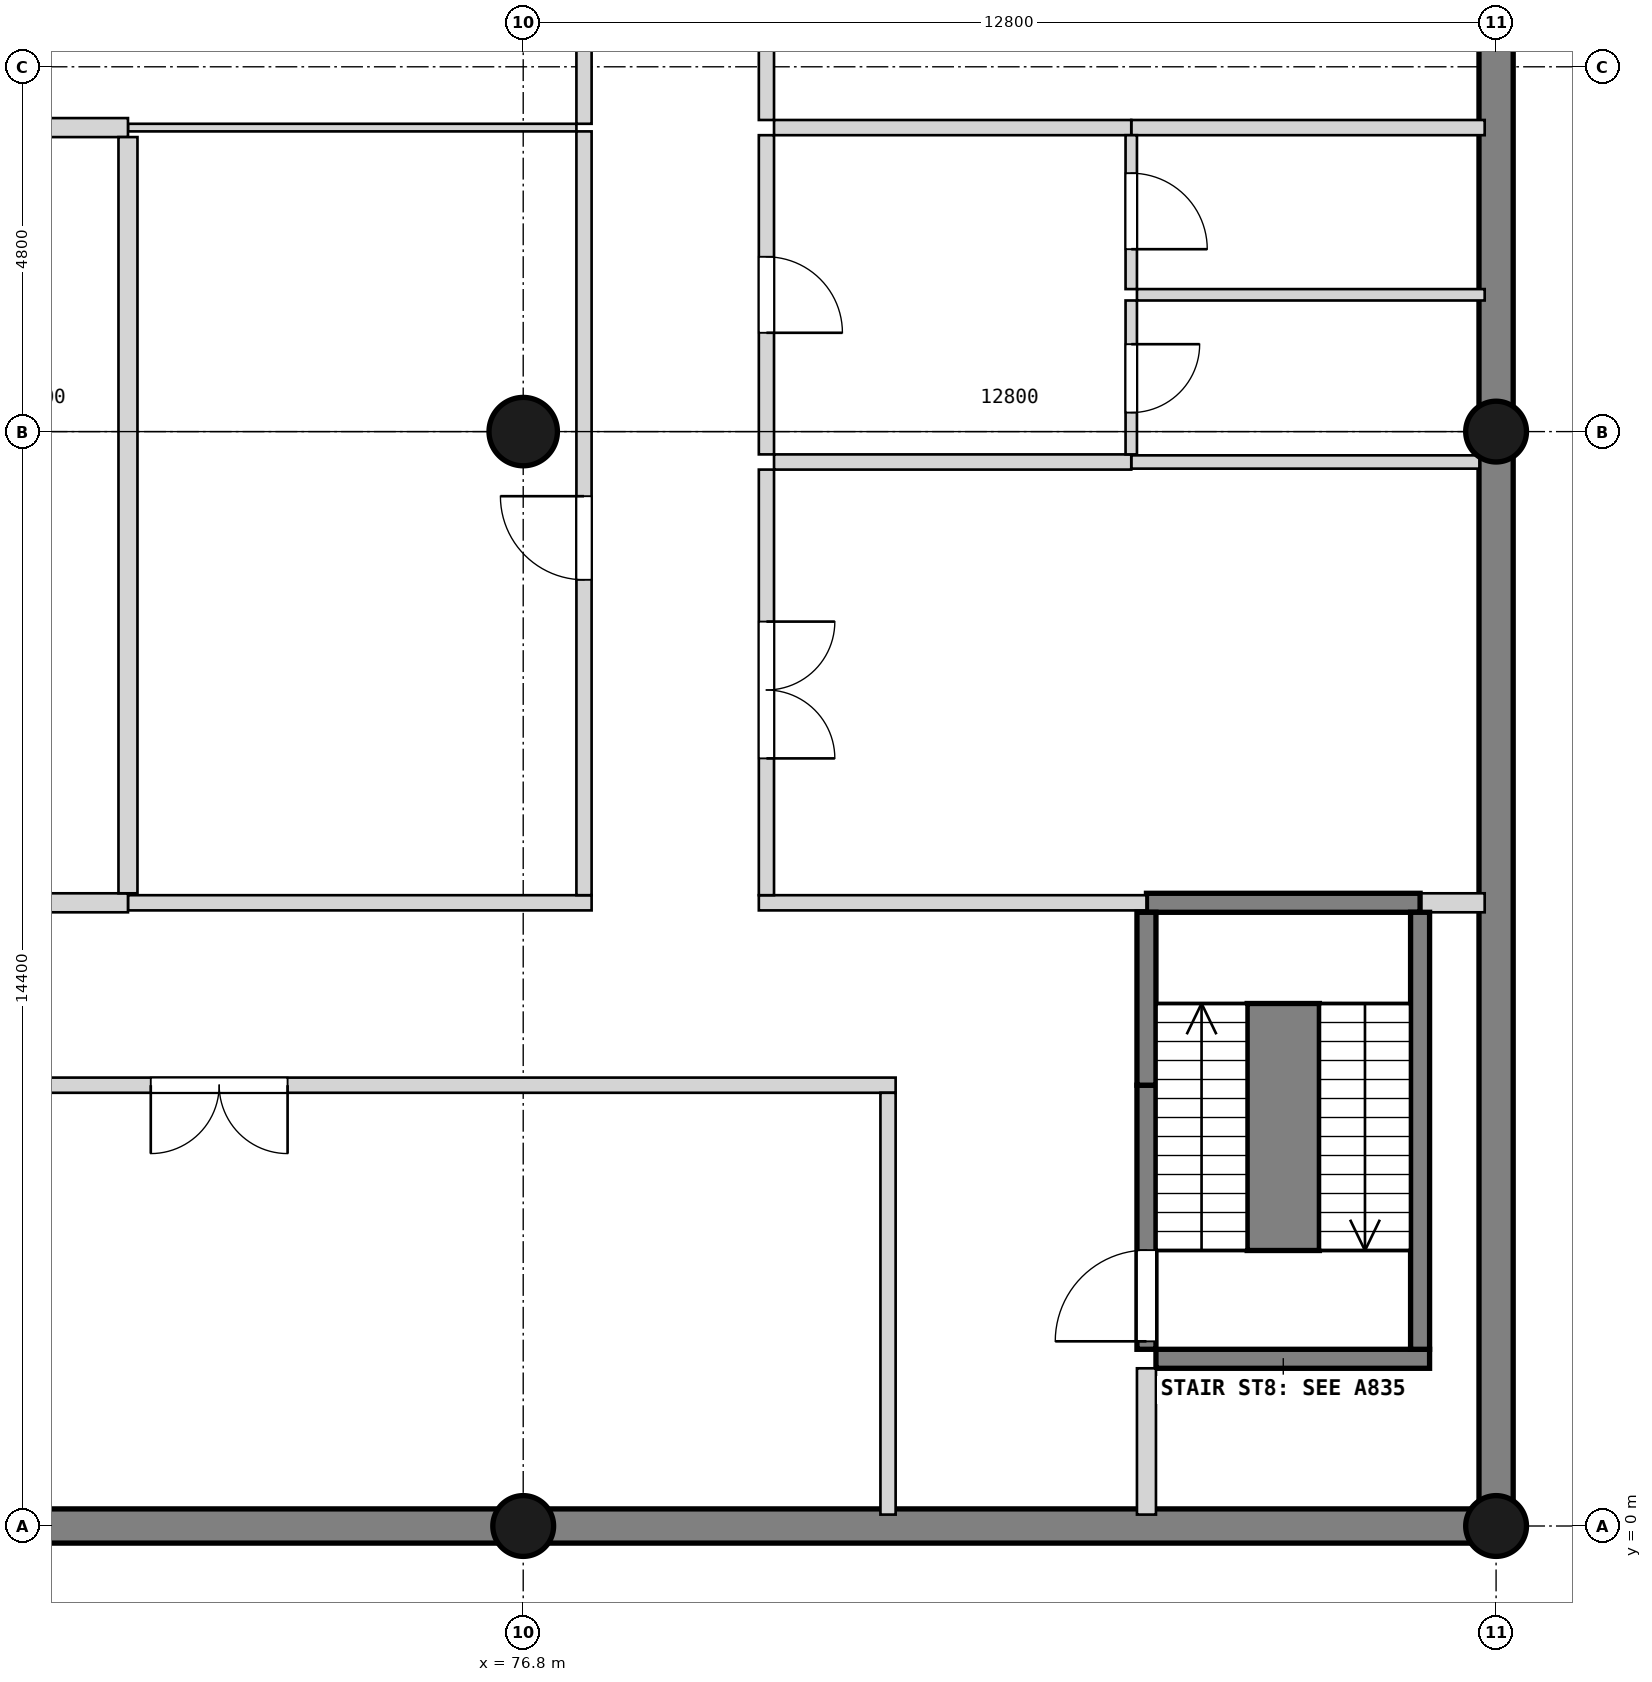
"""IFC4 building model, lengths in metres.
Left out: names, types, materials, properties, quantities, classifications, styles, units other than length and angle.
Written with IfcOpenShell. Run it as: python <this file> out.ifc"""

import sys

from ifc_helpers import new_model, si_unit, direction, frame, frame_2d, origin, origin_2d, place, context, subcontext, project, spatial, rectangle, circle, extrude, element, fill, save


model = new_model("IFC4")
c1 = context("Model", 3, precision=1e-05, world=origin(), true_north=direction((0.0, 1.0)))
c2 = subcontext(c1, "Body", "Model", "MODEL_VIEW")
j1 = project(units=[si_unit("LENGTHUNIT", "METRE"), si_unit("PLANEANGLEUNIT", "RADIAN")], contexts=[c1])
p1 = place(None, origin())
s1 = spatial("IfcSite", under=j1, at=p1, CompositionType="ELEMENT")
p2 = place(p1, origin())
s2 = spatial("IfcBuilding", under=s1, at=p2, CompositionType="ELEMENT")
p3 = place(p2, frame((0.0, 0.0, -4.8)))
s3 = spatial("IfcBuildingStorey", under=s2, at=p3, CompositionType="ELEMENT", Elevation=-4.8)
p4 = place(p3, frame((89.6, -0.225, 0.0), z_axis=(0.0, 0.0, 1.0), x_axis=(0.0, 1.0, 0.0)))
e1 = element("IfcWall", 1, at=p4, inside=s3, PredefinedType="SOLIDWALL", context=c2, shape_type="SweptSolid", body=[
    extrude(rectangle(XDim=58.05, YDim=0.45, at=frame_2d((29.025, 0.0))), origin(), (0.0, 0.0, 1.0), 4.8),
])
p5 = place(p3, frame((89.375, 0.0, 0.0), z_axis=(0.0, 0.0, 1.0), x_axis=(-1.0, 0.0, 0.0)))
e2 = element("IfcWall", 2, at=p5, inside=s3, PredefinedType="SOLIDWALL", context=c2, shape_type="SweptSolid", body=[
    extrude(rectangle(XDim=25.15, YDim=0.45, at=frame_2d((12.575, 0.0))), origin(), (0.0, 0.0, 1.0), 4.8),
])
for number, where, z_axis, x_axis in (
    (3, (89.6, 0.0, 0.0), (0.0, 0.0, 1.0), (1.0, 0.0, 0.0)),
    (4, (89.6, 14.4, 0.0), (0.0, 0.0, 1.0), (1.0, 0.0, 0.0)),
    (5, (76.8, 0.0, 0.0), (0.0, 0.0, 1.0), (1.0, 0.0, 0.0)),
):
    element("IfcColumn", number, at=place(p3, frame(where, z_axis=z_axis, x_axis=x_axis)), inside=s3, PredefinedType="COLUMN", context=c2, shape_type="SweptSolid", body=[
        extrude(circle(Radius=0.4, at=origin_2d()), origin(), (0.0, 0.0, 1.0), 4.8),
    ])
p6 = place(p3, frame((76.8, 14.4, 0.0), z_axis=(0.0, 0.0, 1.0), x_axis=(1.0, 0.0, 0.0)))
e6 = element("IfcColumn", 6, at=p6, inside=s3, PredefinedType="COLUMN", context=c2, shape_type="SweptSolid", body=[
    extrude(circle(Radius=0.45, at=origin_2d()), origin(), (0.0, 0.0, 1.0), 4.8),
])
p7 = place(p3, frame((88.725, 2.2, 0.0), z_axis=(0.0, 0.0, 1.0), x_axis=(-1.0, 0.0, 0.0)))
e7 = element("IfcWall", 7, at=p7, inside=s3, PredefinedType="SHEAR", context=c2, shape_type="SweptSolid", body=[
    extrude(rectangle(XDim=3.6, YDim=0.25, at=frame_2d((1.8, 0.0))), origin(), (0.0, 0.0, 1.0), 4.5),
])
p8 = place(p3, frame((81.7, 5.8, 0.0), z_axis=(0.0, 0.0, 1.0), x_axis=(-1.0, 0.0, 0.0)))
e8 = element("IfcWall", 8, at=p8, inside=s3, PredefinedType="PARTITIONING", context=c2, shape_type="SweptSolid", body=[
    extrude(rectangle(XDim=17.55, YDim=0.2, at=frame_2d((8.775, 0.0))), origin(), (0.0, 0.0, 1.0), 4.5),
])
p9 = place(p8, frame((8.0, 0.0, 0.0)))
e9 = element("IfcOpeningElement", 9, at=p9, cuts=e8, PredefinedType="OPENING", context=c2, shape_type="SweptSolid", body=[
    extrude(rectangle(XDim=1.8, YDim=2.1, at=frame_2d((0.9, 1.05))), frame((0.0, 0.11, 0.0), z_axis=(0.0, -1.0, 0.0), x_axis=(1.0, 0.0, 0.0)), (0.0, 0.0, 1.0), 0.22),
])
p10 = place(p3, frame((89.45, 8.2, 0.0), z_axis=(0.0, 0.0, 1.0), x_axis=(-1.0, 0.0, 0.0)))
e10 = element("IfcWall", 10, at=p10, inside=s3, PredefinedType="PARTITIONING", context=c2, shape_type="SweptSolid", body=[
    extrude(rectangle(XDim=0.85, YDim=0.25, at=frame_2d((0.425, 0.0))), origin(), (0.0, 0.0, 1.0), 4.5),
])
p11 = place(p3, frame((88.6, 8.2, 0.0), z_axis=(0.0, 0.0, 1.0), x_axis=(-1.0, 0.0, 0.0)))
e11 = element("IfcWall", 11, at=p11, inside=s3, PredefinedType="SHEAR", context=c2, shape_type="SweptSolid", body=[
    extrude(rectangle(XDim=3.6, YDim=0.25, at=frame_2d((1.8, 0.0))), origin(), (0.0, 0.0, 1.0), 4.5),
])
p12 = place(p3, frame((85.0, 8.2, 0.0), z_axis=(0.0, 0.0, 1.0), x_axis=(-1.0, 0.0, 0.0)))
e12 = element("IfcWall", 12, at=p12, inside=s3, PredefinedType="PARTITIONING", context=c2, shape_type="SweptSolid", body=[
    extrude(rectangle(XDim=5.1, YDim=0.2, at=frame_2d((2.55, 0.0))), origin(), (0.0, 0.0, 1.0), 4.5),
])
p13 = place(p3, frame((77.7, 8.2, 0.0), z_axis=(0.0, 0.0, 1.0), x_axis=(-1.0, 0.0, 0.0)))
e13 = element("IfcWall", 13, at=p13, inside=s3, PredefinedType="PARTITIONING", context=c2, shape_type="SweptSolid", body=[
    extrude(rectangle(XDim=6.1, YDim=0.2, at=frame_2d((3.05, 0.0))), origin(), (0.0, 0.0, 1.0), 4.5),
])
p14 = place(p3, frame((71.6, 8.2, 0.0), z_axis=(0.0, 0.0, 1.0), x_axis=(-1.0, 0.0, 0.0)))
e14 = element("IfcWall", 14, at=p14, inside=s3, PredefinedType="PARTITIONING", context=c2, shape_type="SweptSolid", body=[
    extrude(rectangle(XDim=7.45, YDim=0.25, at=frame_2d((3.725, 0.0))), origin(), (0.0, 0.0, 1.0), 4.5),
])
p15 = place(p14, frame((3.3, 0.0, 0.0)))
e15 = element("IfcOpeningElement", 15, at=p15, cuts=e14, PredefinedType="OPENING", context=c2, shape_type="SweptSolid", body=[
    extrude(rectangle(XDim=1.0, YDim=2.1, at=frame_2d((0.5, 1.05))), frame((0.0, 0.135, 0.0), z_axis=(0.0, -1.0, 0.0), x_axis=(1.0, 0.0, 0.0)), (0.0, 0.0, 1.0), 0.27),
])
p16 = place(p3, frame((89.38, 14.0, 0.0), z_axis=(0.0, 0.0, 1.0), x_axis=(-1.0, 0.0, 0.0)))
e16 = element("IfcWall", 16, at=p16, inside=s3, PredefinedType="PARTITIONING", context=c2, shape_type="SweptSolid", body=[
    extrude(rectangle(XDim=4.58, YDim=0.175, at=frame_2d((2.29, 0.0))), origin(), (0.0, 0.0, 1.0), 4.5),
])
p17 = place(p3, frame((84.8, 14.0, 0.0), z_axis=(0.0, 0.0, 1.0), x_axis=(-1.0, 0.0, 0.0)))
e17 = element("IfcWall", 17, at=p17, inside=s3, PredefinedType="PARTITIONING", context=c2, shape_type="SweptSolid", body=[
    extrude(rectangle(XDim=4.7, YDim=0.2, at=frame_2d((2.35, 0.0))), origin(), (0.0, 0.0, 1.0), 4.5),
])
p18 = place(p3, frame((89.45, 16.2, 0.0), z_axis=(0.0, 0.0, 1.0), x_axis=(-1.0, 0.0, 0.0)))
e18 = element("IfcWall", 18, at=p18, inside=s3, PredefinedType="PARTITIONING", context=c2, shape_type="SweptSolid", body=[
    extrude(rectangle(XDim=4.575, YDim=0.15, at=frame_2d((2.288, 0.0))), origin(), (0.0, 0.0, 1.0), 4.5),
])
p19 = place(p3, frame((89.45, 18.4, 0.0), z_axis=(0.0, 0.0, 1.0), x_axis=(-1.0, 0.0, 0.0)))
e19 = element("IfcWall", 19, at=p19, inside=s3, PredefinedType="PARTITIONING", context=c2, shape_type="SweptSolid", body=[
    extrude(rectangle(XDim=4.65, YDim=0.2, at=frame_2d((2.325, 0.0))), origin(), (0.0, 0.0, 1.0), 4.5),
])
p20 = place(p3, frame((84.8, 18.4, 0.0), z_axis=(0.0, 0.0, 1.0), x_axis=(-1.0, 0.0, 0.0)))
e20 = element("IfcWall", 20, at=p20, inside=s3, PredefinedType="PARTITIONING", context=c2, shape_type="SweptSolid", body=[
    extrude(rectangle(XDim=4.7, YDim=0.2, at=frame_2d((2.35, 0.0))), origin(), (0.0, 0.0, 1.0), 4.5),
])
p21 = place(p3, frame((77.5, 18.4, 0.0), z_axis=(0.0, 0.0, 1.0), x_axis=(-1.0, 0.0, 0.0)))
e21 = element("IfcWall", 21, at=p21, inside=s3, PredefinedType="PARTITIONING", context=c2, shape_type="SweptSolid", body=[
    extrude(rectangle(XDim=5.9, YDim=0.1, at=frame_2d((2.95, 0.0))), origin(), (0.0, 0.0, 1.0), 4.5),
])
p22 = place(p3, frame((71.6, 18.4, 0.0), z_axis=(0.0, 0.0, 1.0), x_axis=(-1.0, 0.0, 0.0)))
e22 = element("IfcWall", 22, at=p22, inside=s3, PredefinedType="PARTITIONING", context=c2, shape_type="SweptSolid", body=[
    extrude(rectangle(XDim=7.45, YDim=0.25, at=frame_2d((3.725, 0.0))), origin(), (0.0, 0.0, 1.0), 4.5),
])
p23 = place(p3, frame((88.6, 2.325, 0.0), z_axis=(0.0, 0.0, 1.0), x_axis=(0.0, 1.0, 0.0)))
e23 = element("IfcWall", 23, at=p23, inside=s3, PredefinedType="SHEAR", context=c2, shape_type="SweptSolid", body=[
    extrude(rectangle(XDim=5.75, YDim=0.25, at=frame_2d((2.875, 0.0))), origin(), (0.0, 0.0, 1.0), 4.5),
])
p24 = place(p3, frame((85.0, 0.15, 0.0), z_axis=(0.0, 0.0, 1.0), x_axis=(0.0, 1.0, 0.0)))
e24 = element("IfcWall", 24, at=p24, inside=s3, PredefinedType="PARTITIONING", context=c2, shape_type="SweptSolid", body=[
    extrude(rectangle(XDim=1.925, YDim=0.25, at=frame_2d((0.962, 0.0))), origin(), (0.0, 0.0, 1.0), 4.5),
])
p25 = place(p3, frame((85.0, 2.325, 0.0), z_axis=(0.0, 0.0, 1.0), x_axis=(0.0, 1.0, 0.0)))
e25 = element("IfcWall", 25, at=p25, inside=s3, PredefinedType="SHEAR", context=c2, shape_type="SweptSolid", body=[
    extrude(rectangle(XDim=3.475, YDim=0.25, at=frame_2d((1.738, 0.0))), origin(), (0.0, 0.0, 1.0), 4.5),
])
p26 = place(p25, frame((0.105, 0.0, 0.0)))
e26 = element("IfcOpeningElement", 26, at=p26, cuts=e25, PredefinedType="OPENING", context=c2, shape_type="SweptSolid", body=[
    extrude(rectangle(XDim=1.2, YDim=2.1, at=frame_2d((0.6, 1.05))), frame((0.0, 0.135, 0.0), z_axis=(0.0, -1.0, 0.0), x_axis=(1.0, 0.0, 0.0)), (0.0, 0.0, 1.0), 0.27),
])
p27 = place(p3, frame((85.0, 5.8, 0.0), z_axis=(0.0, 0.0, 1.0), x_axis=(0.0, 1.0, 0.0)))
e27 = element("IfcWall", 27, at=p27, inside=s3, PredefinedType="SHEAR", context=c2, shape_type="SweptSolid", body=[
    extrude(rectangle(XDim=2.275, YDim=0.25, at=frame_2d((1.137, 0.0))), origin(), (0.0, 0.0, 1.0), 4.5),
])
p28 = place(p3, frame((84.8, 14.1, 0.0), z_axis=(0.0, 0.0, 1.0), x_axis=(0.0, 1.0, 0.0)))
e28 = element("IfcWall", 28, at=p28, inside=s3, PredefinedType="PARTITIONING", context=c2, shape_type="SweptSolid", body=[
    extrude(rectangle(XDim=2.025, YDim=0.15, at=frame_2d((1.012, 0.0))), origin(), (0.0, 0.0, 1.0), 4.5),
])
p29 = place(p28, frame((0.55, 0.0, 0.0)))
e29 = element("IfcOpeningElement", 29, at=p29, cuts=e28, PredefinedType="OPENING", context=c2, shape_type="SweptSolid", body=[
    extrude(rectangle(XDim=0.9, YDim=2.1, at=frame_2d((0.45, 1.05))), frame((0.0, 0.085, 0.0), z_axis=(0.0, -1.0, 0.0), x_axis=(1.0, 0.0, 0.0)), (0.0, 0.0, 1.0), 0.17),
])
p30 = place(p3, frame((84.8, 16.275, 0.0), z_axis=(0.0, 0.0, 1.0), x_axis=(0.0, 1.0, 0.0)))
e30 = element("IfcWall", 30, at=p30, inside=s3, PredefinedType="PARTITIONING", context=c2, shape_type="SweptSolid", body=[
    extrude(rectangle(XDim=2.025, YDim=0.15, at=frame_2d((1.013, 0.0))), origin(), (0.0, 0.0, 1.0), 4.5),
])
p31 = place(p30, frame((0.525, 0.0, 0.0)))
e31 = element("IfcOpeningElement", 31, at=p31, cuts=e30, PredefinedType="OPENING", context=c2, shape_type="SweptSolid", body=[
    extrude(rectangle(XDim=1.0, YDim=2.1, at=frame_2d((0.5, 1.05))), frame((0.0, 0.085, 0.0), z_axis=(0.0, -1.0, 0.0), x_axis=(1.0, 0.0, 0.0)), (0.0, 0.0, 1.0), 0.17),
])
p32 = place(p3, frame((81.6, 0.15, 0.0), z_axis=(0.0, 0.0, 1.0), x_axis=(0.0, 1.0, 0.0)))
e32 = element("IfcWall", 32, at=p32, inside=s3, PredefinedType="PARTITIONING", context=c2, shape_type="SweptSolid", body=[
    extrude(rectangle(XDim=5.55, YDim=0.2, at=frame_2d((2.775, 0.0))), origin(), (0.0, 0.0, 1.0), 4.5),
])
p33 = place(p3, frame((80.0, 8.3, 0.0), z_axis=(0.0, 0.0, 1.0), x_axis=(0.0, 1.0, 0.0)))
e33 = element("IfcWall", 33, at=p33, inside=s3, PredefinedType="PARTITIONING", context=c2, shape_type="SweptSolid", body=[
    extrude(rectangle(XDim=5.6, YDim=0.2, at=frame_2d((2.8, 0.0))), origin(), (0.0, 0.0, 1.0), 3.6),
])
p34 = place(p33, frame((1.8, 0.0, 0.0)))
e34 = element("IfcOpeningElement", 34, at=p34, cuts=e33, PredefinedType="OPENING", context=c2, shape_type="SweptSolid", body=[
    extrude(rectangle(XDim=1.8, YDim=2.1, at=frame_2d((0.9, 1.05))), frame((0.0, 0.11, 0.0), z_axis=(0.0, -1.0, 0.0), x_axis=(1.0, 0.0, 0.0)), (0.0, 0.0, 1.0), 0.22),
])
p35 = place(p3, frame((80.0, 14.1, 0.0), z_axis=(0.0, 0.0, 1.0), x_axis=(0.0, 1.0, 0.0)))
e35 = element("IfcWall", 35, at=p35, inside=s3, PredefinedType="PARTITIONING", context=c2, shape_type="SweptSolid", body=[
    extrude(rectangle(XDim=4.2, YDim=0.2, at=frame_2d((2.1, 0.0))), origin(), (0.0, 0.0, 1.0), 3.6),
])
p36 = place(p35, frame((1.6, 0.0, 0.0)))
e36 = element("IfcOpeningElement", 36, at=p36, cuts=e35, PredefinedType="OPENING", context=c2, shape_type="SweptSolid", body=[
    extrude(rectangle(XDim=1.0, YDim=2.1, at=frame_2d((0.5, 1.05))), frame((0.0, 0.11, 0.0), z_axis=(0.0, -1.0, 0.0), x_axis=(1.0, 0.0, 0.0)), (0.0, 0.0, 1.0), 0.22),
])
p37 = place(p3, frame((80.0, 18.5, 0.0), z_axis=(0.0, 0.0, 1.0), x_axis=(0.0, 1.0, 0.0)))
e37 = element("IfcWall", 37, at=p37, inside=s3, PredefinedType="PARTITIONING", context=c2, shape_type="SweptSolid", body=[
    extrude(rectangle(XDim=10.2, YDim=0.2, at=frame_2d((5.1, 0.0))), origin(), (0.0, 0.0, 1.0), 3.6),
])
p38 = place(p37, frame((4.2, 0.0, 0.0)))
e38 = element("IfcOpeningElement", 38, at=p38, cuts=e37, PredefinedType="OPENING", context=c2, shape_type="SweptSolid", body=[
    extrude(rectangle(XDim=1.8, YDim=2.1, at=frame_2d((0.9, 1.05))), frame((0.0, 0.11, 0.0), z_axis=(0.0, -1.0, 0.0), x_axis=(1.0, 0.0, 0.0)), (0.0, 0.0, 1.0), 0.22),
])
p39 = place(p3, frame((77.6, 8.3, 0.0), z_axis=(0.0, 0.0, 1.0), x_axis=(0.0, 1.0, 0.0)))
e39 = element("IfcWall", 39, at=p39, inside=s3, PredefinedType="PARTITIONING", context=c2, shape_type="SweptSolid", body=[
    extrude(rectangle(XDim=10.05, YDim=0.2, at=frame_2d((5.025, 0.0))), origin(), (0.0, 0.0, 1.0), 4.5),
])
p40 = place(p39, frame((4.15, 0.0, 0.0)))
e40 = element("IfcOpeningElement", 40, at=p40, cuts=e39, PredefinedType="OPENING", context=c2, shape_type="SweptSolid", body=[
    extrude(rectangle(XDim=1.1, YDim=2.1, at=frame_2d((0.55, 1.05))), frame((0.0, 0.11, 0.0), z_axis=(0.0, -1.0, 0.0), x_axis=(1.0, 0.0, 0.0)), (0.0, 0.0, 1.0), 0.22),
])
p41 = place(p3, frame((77.6, 18.45, 0.0), z_axis=(0.0, 0.0, 1.0), x_axis=(0.0, 1.0, 0.0)))
e41 = element("IfcWall", 41, at=p41, inside=s3, PredefinedType="PARTITIONING", context=c2, shape_type="SweptSolid", body=[
    extrude(rectangle(XDim=5.1, YDim=0.2, at=frame_2d((2.55, 0.0))), origin(), (0.0, 0.0, 1.0), 4.5),
])
p42 = place(p41, frame((2.0, 0.0, 0.0)))
e42 = element("IfcOpeningElement", 42, at=p42, cuts=e41, PredefinedType="OPENING", context=c2, shape_type="SweptSolid", body=[
    extrude(rectangle(XDim=1.1, YDim=2.1, at=frame_2d((0.55, 1.05))), frame((0.0, 0.11, 0.0), z_axis=(0.0, -1.0, 0.0), x_axis=(1.0, 0.0, 0.0)), (0.0, 0.0, 1.0), 0.22),
])
p43 = place(p3, frame((71.6, 8.325, 0.0), z_axis=(0.0, 0.0, 1.0), x_axis=(0.0, 1.0, 0.0)))
e43 = element("IfcWall", 43, at=p43, inside=s3, PredefinedType="PARTITIONING", context=c2, shape_type="SweptSolid", body=[
    extrude(rectangle(XDim=9.95, YDim=0.25, at=frame_2d((4.975, 0.0))), origin(), (0.0, 0.0, 1.0), 4.5),
])
p44 = place(p3, frame((86.8, 3.625, 0.0), z_axis=(0.0, 0.0, 1.0), x_axis=(0.0, 1.0, 0.0)))
e44 = element("IfcWall", 44, at=p44, inside=s3, PredefinedType="SHEAR", context=c2, shape_type="SweptSolid", body=[
    extrude(rectangle(XDim=3.25, YDim=0.95, at=frame_2d((1.625, 0.0))), origin(), (0.0, 0.0, 1.0), 4.8),
])
p45 = place(p26, origin())
e45 = element("IfcDoor", 45, at=p45, inside=s3, OperationType="SINGLE_SWING_LEFT", PredefinedType="DOOR", context=c2, shape_type="SweptSolid", body=[
    extrude(rectangle(XDim=1.2, YDim=2.1, at=frame_2d((0.6, 1.05))), frame((0.0, 0.025, 0.0), z_axis=(0.0, -1.0, 0.0), x_axis=(1.0, 0.0, 0.0)), (0.0, 0.0, 1.0), 0.05),
])
fill(e26, e45)
p46 = place(p9, origin())
e46 = element("IfcDoor", 46, at=p46, inside=s3, OperationType="DOUBLE_DOOR_SINGLE_SWING", PredefinedType="DOOR", context=c2, shape_type="SweptSolid", body=[
    extrude(rectangle(XDim=1.8, YDim=2.1, at=frame_2d((0.9, 1.05))), frame((0.0, 0.025, 0.0), z_axis=(0.0, -1.0, 0.0), x_axis=(1.0, 0.0, 0.0)), (0.0, 0.0, 1.0), 0.05),
])
fill(e9, e46)
p47 = place(p34, frame((1.8, 0.0, 0.0), z_axis=(0.0, 0.0, 1.0), x_axis=(-1.0, 0.0, 0.0)))
e47 = element("IfcDoor", 47, at=p47, inside=s3, OperationType="DOUBLE_DOOR_SINGLE_SWING", PredefinedType="DOOR", context=c2, shape_type="SweptSolid", body=[
    extrude(rectangle(XDim=1.8, YDim=2.1, at=frame_2d((0.9, 1.05))), frame((0.0, 0.025, 0.0), z_axis=(0.0, -1.0, 0.0), x_axis=(1.0, 0.0, 0.0)), (0.0, 0.0, 1.0), 0.05),
])
fill(e34, e47)
p48 = place(p36, frame((1.0, 0.0, 0.0), z_axis=(0.0, 0.0, 1.0), x_axis=(-1.0, 0.0, 0.0)))
e48 = element("IfcDoor", 48, at=p48, inside=s3, OperationType="SINGLE_SWING_RIGHT", PredefinedType="DOOR", context=c2, shape_type="SweptSolid", body=[
    extrude(rectangle(XDim=1.0, YDim=2.1, at=frame_2d((0.5, 1.05))), frame((0.0, 0.025, 0.0), z_axis=(0.0, -1.0, 0.0), x_axis=(1.0, 0.0, 0.0)), (0.0, 0.0, 1.0), 0.05),
])
fill(e36, e48)
p49 = place(p29, frame((0.9, 0.0, 0.0), z_axis=(0.0, 0.0, 1.0), x_axis=(-1.0, 0.0, 0.0)))
e49 = element("IfcDoor", 49, at=p49, inside=s3, OperationType="SINGLE_SWING_LEFT", PredefinedType="DOOR", context=c2, shape_type="SweptSolid", body=[
    extrude(rectangle(XDim=0.9, YDim=2.1, at=frame_2d((0.45, 1.05))), frame((0.0, 0.025, 0.0), z_axis=(0.0, -1.0, 0.0), x_axis=(1.0, 0.0, 0.0)), (0.0, 0.0, 1.0), 0.05),
])
fill(e29, e49)
p50 = place(p31, frame((1.0, 0.0, 0.0), z_axis=(0.0, 0.0, 1.0), x_axis=(-1.0, 0.0, 0.0)))
e50 = element("IfcDoor", 50, at=p50, inside=s3, OperationType="SINGLE_SWING_RIGHT", PredefinedType="DOOR", context=c2, shape_type="SweptSolid", body=[
    extrude(rectangle(XDim=1.0, YDim=2.1, at=frame_2d((0.5, 1.05))), frame((0.0, 0.025, 0.0), z_axis=(0.0, -1.0, 0.0), x_axis=(1.0, 0.0, 0.0)), (0.0, 0.0, 1.0), 0.05),
])
fill(e31, e50)
p51 = place(p40, origin())
e51 = element("IfcDoor", 51, at=p51, inside=s3, OperationType="SINGLE_SWING_RIGHT", PredefinedType="DOOR", context=c2, shape_type="SweptSolid", body=[
    extrude(rectangle(XDim=1.1, YDim=2.1, at=frame_2d((0.55, 1.05))), frame((0.0, 0.025, 0.0), z_axis=(0.0, -1.0, 0.0), x_axis=(1.0, 0.0, 0.0)), (0.0, 0.0, 1.0), 0.05),
])
fill(e40, e51)
save(model, sys.argv[1])
